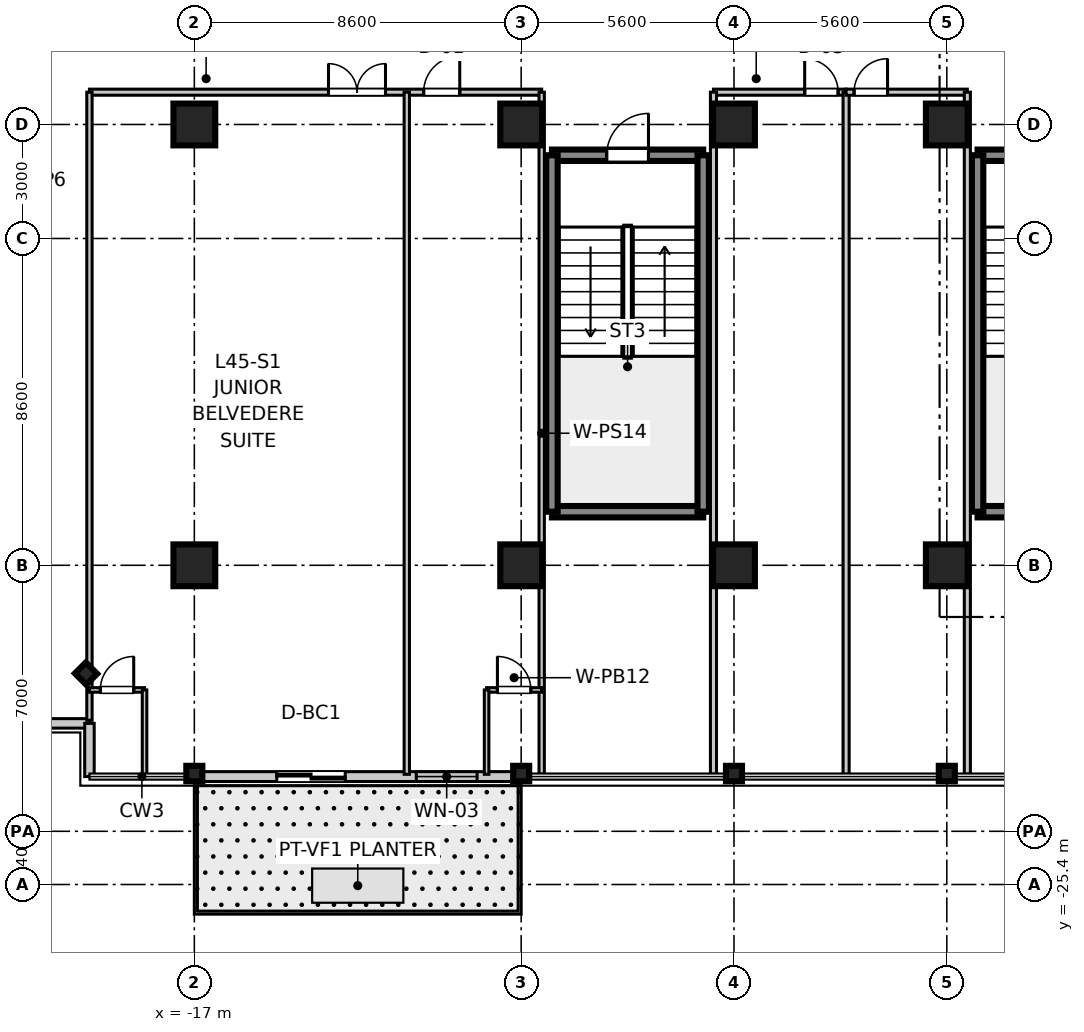
"""IFC4 building model, lengths in metres.
Left out: names, types, materials, properties, quantities, classifications, styles, units other than length and angle.
Written with IfcOpenShell. Run it as: python <this file> out.ifc"""

import sys

from ifc_helpers import new_model, si_unit, direction, frame, frame_2d, origin, origin_2d, place, context, subcontext, project, spatial, rectangle, i_section, extrude, source, transform, mapped, element, fill, save


model = new_model("IFC4")
c1 = context("Model", 3, precision=1e-05, world=origin(), true_north=direction((0.0, 1.0)))
c2 = subcontext(c1, "Body", "Model", "MODEL_VIEW")
j1 = project(units=[si_unit("LENGTHUNIT", "METRE"), si_unit("PLANEANGLEUNIT", "RADIAN")], contexts=[c1])
p1 = place(None, origin())
s1 = spatial("IfcSite", under=j1, at=p1, CompositionType="ELEMENT")
p2 = place(p1, origin())
s2 = spatial("IfcBuilding", under=s1, at=p2, CompositionType="ELEMENT")
p3 = place(p2, frame((0.0, 0.0, 178.2)))
s3 = spatial("IfcBuildingStorey", under=s2, at=p3, CompositionType="ELEMENT", Elevation=178.2)
m1 = source(origin(), c2, "Body", "SweptSolid", [
    extrude(rectangle(XDim=1.1, YDim=1.1, at=origin_2d()), origin(), (0.0, 0.0, 1.0), 3.605),
])
for number, where, z_axis, x_axis in (
    (1, (-17.0, -17.0, 0.0), (0.0, 0.0, 1.0), (1.0, 0.0, 0.0)),
    (2, (-17.0, -5.4, 0.0), (0.0, 0.0, 1.0), (1.0, 0.0, 0.0)),
    (3, (-8.4, -17.0, 0.0), (0.0, 0.0, 1.0), (1.0, 0.0, 0.0)),
    (4, (-8.4, -5.4, 0.0), (0.0, 0.0, 1.0), (1.0, 0.0, 0.0)),
    (5, (-2.8, -17.0, 0.0), (0.0, 0.0, 1.0), (1.0, 0.0, 0.0)),
    (6, (-2.8, -5.4, 0.0), (0.0, 0.0, 1.0), (1.0, 0.0, 0.0)),
    (7, (2.8, -17.0, 0.0), (0.0, 0.0, 1.0), (1.0, 0.0, 0.0)),
    (8, (2.8, -5.4, 0.0), (0.0, 0.0, 1.0), (1.0, 0.0, 0.0)),
):
    element("IfcColumn", number, at=place(p3, frame(where, z_axis=z_axis, x_axis=x_axis)), inside=s3, PredefinedType="COLUMN", context=c2, shape_type="MappedRepresentation", body=[
        mapped(m1, transform((0.0, 0.0, 0.0), scale=1.0)),
    ])
m2 = source(origin(), c2, "Body", "SweptSolid", [
    extrude(i_section(OverallWidth=0.406, OverallDepth=0.422, WebThickness=0.019, FlangeThickness=0.03, at=origin_2d()), origin(), (0.0, 0.0, 1.0), 3.605),
])
for number, where, z_axis, x_axis in (
    (9, (-17.0, -22.48, 0.0), (0.0, 0.0, 1.0), (0.0, 1.0, 0.0)),
    (10, (-8.4, -22.48, 0.0), (0.0, 0.0, 1.0), (0.0, 1.0, 0.0)),
    (11, (-2.8, -22.48, 0.0), (0.0, 0.0, 1.0), (0.0, 1.0, 0.0)),
    (12, (2.8, -22.48, 0.0), (0.0, 0.0, 1.0), (0.0, 1.0, 0.0)),
    (13, (-19.85, -19.85, 0.0), (0.0, 0.0, 1.0), (0.707, 0.707, 0.0)),
):
    element("IfcColumn", number, at=place(p3, frame(where, z_axis=z_axis, x_axis=x_axis)), inside=s3, PredefinedType="COLUMN", context=c2, shape_type="MappedRepresentation", body=[
        mapped(m2, transform((0.0, 0.0, 0.0), scale=1.0)),
    ])
m3 = source(origin(), c2, "Body", "SweptSolid", [
    extrude(rectangle(XDim=3.98, YDim=0.3, at=frame_2d((1.99, 0.0))), origin(), (0.0, 0.0, 1.0), 3.39),
])
for number, where, z_axis, x_axis in (
    (14, (3.61, -15.59, 0.0), (0.0, 0.0, 1.0), (1.0, 0.0, 0.0)),
    (15, (3.61, -6.21, 0.0), (0.0, 0.0, 1.0), (1.0, 0.0, 0.0)),
):
    element("IfcWall", number, at=place(p3, frame(where, z_axis=z_axis, x_axis=x_axis)), inside=s3, PredefinedType="SHEAR", context=c2, shape_type="MappedRepresentation", body=[
        mapped(m3, transform((0.0, 0.0, 0.0), scale=1.0)),
    ])
m4 = source(origin(), c2, "Body", "SweptSolid", [
    extrude(rectangle(XDim=9.38, YDim=0.3, at=frame_2d((4.69, 0.0))), origin(), (0.0, 0.0, 1.0), 3.39),
])
p4 = place(p3, frame((3.61, -15.59, 0.0), z_axis=(0.0, 0.0, 1.0), x_axis=(0.0, 1.0, 0.0)))
e16 = element("IfcWall", 16, at=p4, inside=s3, PredefinedType="SHEAR", context=c2, shape_type="MappedRepresentation", body=[
    mapped(m4, transform((0.0, 0.0, 0.0), scale=1.0)),
])
p5 = place(p3, frame((-7.59, -15.59, 0.0), z_axis=(0.0, 0.0, 1.0), x_axis=(1.0, 0.0, 0.0)))
e17 = element("IfcWall", 17, at=p5, inside=s3, PredefinedType="SHEAR", context=c2, shape_type="MappedRepresentation", body=[
    mapped(m3, transform((0.0, 0.0, 0.0), scale=1.0)),
])
p6 = place(p3, frame((-7.59, -6.21, 0.0), z_axis=(0.0, 0.0, 1.0), x_axis=(1.0, 0.0, 0.0)))
e18 = element("IfcWall", 18, at=p6, inside=s3, PredefinedType="SHEAR", context=c2, shape_type="MappedRepresentation", body=[
    mapped(m3, transform((0.0, 0.0, 0.0), scale=1.0)),
])
p7 = place(p6, frame((1.44, 0.0, 0.0)))
e19 = element("IfcOpeningElement", 19, at=p7, cuts=e18, PredefinedType="OPENING", context=c2, shape_type="SweptSolid", body=[
    extrude(rectangle(XDim=1.1, YDim=2.15, at=frame_2d((0.55, 1.075))), frame((0.0, 0.16, 0.0), z_axis=(0.0, -1.0, 0.0), x_axis=(1.0, 0.0, 0.0)), (0.0, 0.0, 1.0), 0.32),
])
for number, where, z_axis, x_axis in (
    (20, (-7.59, -15.59, 0.0), (0.0, 0.0, 1.0), (0.0, 1.0, 0.0)),
    (21, (-3.61, -15.59, 0.0), (0.0, 0.0, 1.0), (0.0, 1.0, 0.0)),
):
    element("IfcWall", number, at=place(p3, frame(where, z_axis=z_axis, x_axis=x_axis)), inside=s3, PredefinedType="SHEAR", context=c2, shape_type="MappedRepresentation", body=[
        mapped(m4, transform((0.0, 0.0, 0.0), scale=1.0)),
    ])
m5 = source(origin(), c2, "Body", "SweptSolid", [
    extrude(rectangle(XDim=1.4, YDim=0.25, at=frame_2d((0.7, 0.0))), origin(), (0.0, 0.0, 1.0), 3.39),
])
p8 = place(p3, frame((-21.16, -21.16, 0.0), z_axis=(0.0, 0.0, 1.0), x_axis=(1.0, 0.0, 0.0)))
e22 = element("IfcWall", 22, at=p8, inside=s3, PredefinedType="STANDARD", context=c2, shape_type="MappedRepresentation", body=[
    mapped(m5, transform((0.0, 0.0, 0.0), scale=1.0)),
])
m6 = source(origin(), c2, "Body", "SweptSolid", [
    extrude(rectangle(XDim=1.4, YDim=0.25, at=frame_2d((0.7, 0.0))), origin(), (0.0, 0.0, 1.0), 3.39),
])
p9 = place(p3, frame((-19.76, -22.56, 0.0), z_axis=(0.0, 0.0, 1.0), x_axis=(0.0, 1.0, 0.0)))
e23 = element("IfcWall", 23, at=p9, inside=s3, PredefinedType="STANDARD", context=c2, shape_type="MappedRepresentation", body=[
    mapped(m6, transform((0.0, 0.0, 0.0), scale=1.0)),
])
m7 = source(origin(), c2, "Body", "SweptSolid", [
    extrude(rectangle(XDim=8.6, YDim=0.26, at=frame_2d((4.3, 0.0))), origin(), (0.0, 0.0, 1.0), 2.87),
])
p10 = place(p3, frame((-17.0, -22.56, 0.0), z_axis=(0.0, 0.0, 1.0), x_axis=(1.0, 0.0, 0.0)))
e24 = element("IfcWall", 24, at=p10, inside=s3, PredefinedType="STANDARD", context=c2, shape_type="MappedRepresentation", body=[
    mapped(m7, transform((0.0, 0.0, 0.0), scale=1.0)),
])
p11 = place(p10, frame((2.17, 0.0, 0.0)))
e25 = element("IfcOpeningElement", 25, at=p11, cuts=e24, PredefinedType="OPENING", context=c2, shape_type="SweptSolid", body=[
    extrude(rectangle(XDim=1.8, YDim=2.25, at=frame_2d((0.9, 1.125))), frame((0.0, 0.14, 0.0), z_axis=(0.0, -1.0, 0.0), x_axis=(1.0, 0.0, 0.0)), (0.0, 0.0, 1.0), 0.28),
])
p12 = place(p10, frame((5.84, 0.0, 0.85)))
e26 = element("IfcOpeningElement", 26, at=p12, cuts=e24, PredefinedType="OPENING", context=c2, shape_type="SweptSolid", body=[
    extrude(rectangle(XDim=1.6, YDim=1.8, at=frame_2d((0.8, 0.9))), frame((0.0, 0.14, 0.0), z_axis=(0.0, -1.0, 0.0), x_axis=(1.0, 0.0, 0.0)), (0.0, 0.0, 1.0), 0.28),
])
m8 = source(origin(), c2, "Body", "SweptSolid", [
    extrude(rectangle(XDim=11.9, YDim=0.16, at=frame_2d((5.95, 0.0))), origin(), (0.0, 0.0, 1.0), 2.73),
])
p13 = place(p3, frame((-19.76, -4.55, 0.0), z_axis=(0.0, 0.0, 1.0), x_axis=(1.0, 0.0, 0.0)))
e27 = element("IfcWall", 27, at=p13, inside=s3, PredefinedType="PARTITIONING", context=c2, shape_type="MappedRepresentation", body=[
    mapped(m8, transform((0.0, 0.0, 0.0), scale=1.0)),
])
p14 = place(p13, frame((6.29, 0.0, 0.0)))
e28 = element("IfcOpeningElement", 28, at=p14, cuts=e27, PredefinedType="OPENING", context=c2, shape_type="SweptSolid", body=[
    extrude(rectangle(XDim=1.5, YDim=2.15, at=frame_2d((0.75, 1.075))), frame((0.0, 0.09, 0.0), z_axis=(0.0, -1.0, 0.0), x_axis=(1.0, 0.0, 0.0)), (0.0, 0.0, 1.0), 0.18),
])
p15 = place(p13, frame((8.794, 0.0, 0.0)))
e29 = element("IfcOpeningElement", 29, at=p15, cuts=e27, PredefinedType="OPENING", context=c2, shape_type="SweptSolid", body=[
    extrude(rectangle(XDim=0.95, YDim=2.1, at=frame_2d((0.475, 1.05))), frame((0.0, 0.09, 0.0), z_axis=(0.0, -1.0, 0.0), x_axis=(1.0, 0.0, 0.0)), (0.0, 0.0, 1.0), 0.18),
])
m9 = source(origin(), c2, "Body", "SweptSolid", [
    extrude(rectangle(XDim=16.53, YDim=0.14, at=frame_2d((8.265, 0.0))), origin(), (0.0, 0.0, 1.0), 2.73),
])
p16 = place(p3, frame((-19.76, -21.08, 0.0), z_axis=(0.0, 0.0, 1.0), x_axis=(0.0, 1.0, 0.0)))
e30 = element("IfcWall", 30, at=p16, inside=s3, PredefinedType="PARTITIONING", context=c2, shape_type="MappedRepresentation", body=[
    mapped(m9, transform((0.0, 0.0, 0.0), scale=1.0)),
])
m10 = source(origin(), c2, "Body", "SweptSolid", [
    extrude(rectangle(XDim=17.95, YDim=0.14, at=frame_2d((8.975, 0.0))), origin(), (0.0, 0.0, 1.0), 2.73),
])
p17 = place(p3, frame((-7.86, -22.5, 0.0), z_axis=(0.0, 0.0, 1.0), x_axis=(0.0, 1.0, 0.0)))
e31 = element("IfcWall", 31, at=p17, inside=s3, PredefinedType="PARTITIONING", context=c2, shape_type="MappedRepresentation", body=[
    mapped(m10, transform((0.0, 0.0, 0.0), scale=1.0)),
])
m11 = source(origin(), c2, "Body", "SweptSolid", [
    extrude(rectangle(XDim=1.45, YDim=0.12, at=frame_2d((0.725, 0.0))), origin(), (0.0, 0.0, 1.0), 2.73),
])
p18 = place(p3, frame((-19.76, -20.28, 0.0), z_axis=(0.0, 0.0, 1.0), x_axis=(1.0, 0.0, 0.0)))
e32 = element("IfcWall", 32, at=p18, inside=s3, PredefinedType="PARTITIONING", context=c2, shape_type="MappedRepresentation", body=[
    mapped(m11, transform((0.0, 0.0, 0.0), scale=1.0)),
])
p19 = place(p18, frame((0.285, 0.0, 0.0)))
e33 = element("IfcOpeningElement", 33, at=p19, cuts=e32, PredefinedType="OPENING", context=c2, shape_type="SweptSolid", body=[
    extrude(rectangle(XDim=0.88, YDim=2.1, at=frame_2d((0.44, 1.05))), frame((0.0, 0.07, 0.0), z_axis=(0.0, -1.0, 0.0), x_axis=(1.0, 0.0, 0.0)), (0.0, 0.0, 1.0), 0.14),
])
m12 = source(origin(), c2, "Body", "SweptSolid", [
    extrude(rectangle(XDim=2.22, YDim=0.12, at=frame_2d((1.11, 0.0))), origin(), (0.0, 0.0, 1.0), 2.73),
])
p20 = place(p3, frame((-18.31, -22.5, 0.0), z_axis=(0.0, 0.0, 1.0), x_axis=(0.0, 1.0, 0.0)))
e34 = element("IfcWall", 34, at=p20, inside=s3, PredefinedType="PARTITIONING", context=c2, shape_type="MappedRepresentation", body=[
    mapped(m12, transform((0.0, 0.0, 0.0), scale=1.0)),
])
p21 = place(p3, frame((-11.41, -22.5, 0.0), z_axis=(0.0, 0.0, 1.0), x_axis=(0.0, 1.0, 0.0)))
e35 = element("IfcWall", 35, at=p21, inside=s3, PredefinedType="PARTITIONING", context=c2, shape_type="MappedRepresentation", body=[
    mapped(m10, transform((0.0, 0.0, 0.0), scale=1.0)),
])
p22 = place(p3, frame((-9.31, -20.28, 0.0), z_axis=(0.0, 0.0, 1.0), x_axis=(1.0, 0.0, 0.0)))
e36 = element("IfcWall", 36, at=p22, inside=s3, PredefinedType="PARTITIONING", context=c2, shape_type="MappedRepresentation", body=[
    mapped(m11, transform((0.0, 0.0, 0.0), scale=1.0)),
])
p23 = place(p22, frame((0.285, 0.0, 0.0)))
e37 = element("IfcOpeningElement", 37, at=p23, cuts=e36, PredefinedType="OPENING", context=c2, shape_type="SweptSolid", body=[
    extrude(rectangle(XDim=0.88, YDim=2.1, at=frame_2d((0.44, 1.05))), frame((0.0, 0.07, 0.0), z_axis=(0.0, -1.0, 0.0), x_axis=(1.0, 0.0, 0.0)), (0.0, 0.0, 1.0), 0.14),
])
p24 = place(p3, frame((-9.31, -22.5, 0.0), z_axis=(0.0, 0.0, 1.0), x_axis=(0.0, 1.0, 0.0)))
e38 = element("IfcWall", 38, at=p24, inside=s3, PredefinedType="PARTITIONING", context=c2, shape_type="MappedRepresentation", body=[
    mapped(m12, transform((0.0, 0.0, 0.0), scale=1.0)),
])
m13 = source(origin(), c2, "Body", "SweptSolid", [
    extrude(rectangle(XDim=3.49, YDim=0.16, at=frame_2d((1.745, 0.0))), origin(), (0.0, 0.0, 1.0), 2.73),
])
p25 = place(p3, frame((-3.34, -4.55, 0.0), z_axis=(0.0, 0.0, 1.0), x_axis=(1.0, 0.0, 0.0)))
e39 = element("IfcWall", 39, at=p25, inside=s3, PredefinedType="PARTITIONING", context=c2, shape_type="MappedRepresentation", body=[
    mapped(m13, transform((0.0, 0.0, 0.0), scale=1.0)),
])
p26 = place(p25, frame((2.4, 0.0, 0.0)))
e40 = element("IfcOpeningElement", 40, at=p26, cuts=e39, PredefinedType="OPENING", context=c2, shape_type="SweptSolid", body=[
    extrude(rectangle(XDim=0.88, YDim=2.1, at=frame_2d((0.44, 1.05))), frame((0.0, 0.09, 0.0), z_axis=(0.0, -1.0, 0.0), x_axis=(1.0, 0.0, 0.0)), (0.0, 0.0, 1.0), 0.18),
])
m14 = source(origin(), c2, "Body", "SweptSolid", [
    extrude(rectangle(XDim=17.95, YDim=0.16, at=frame_2d((8.975, 0.0))), origin(), (0.0, 0.0, 1.0), 2.73),
])
for number, where, z_axis, x_axis in (
    (41, (-3.34, -22.5, 0.0), (0.0, 0.0, 1.0), (0.0, 1.0, 0.0)),
    (42, (0.15, -22.5, 0.0), (0.0, 0.0, 1.0), (0.0, 1.0, 0.0)),
):
    element("IfcWall", number, at=place(p3, frame(where, z_axis=z_axis, x_axis=x_axis)), inside=s3, PredefinedType="PARTITIONING", context=c2, shape_type="MappedRepresentation", body=[
        mapped(m14, transform((0.0, 0.0, 0.0), scale=1.0)),
    ])
m15 = source(origin(), c2, "Body", "SweptSolid", [
    extrude(rectangle(XDim=3.19, YDim=0.16, at=frame_2d((1.595, 0.0))), origin(), (0.0, 0.0, 1.0), 2.73),
])
p27 = place(p3, frame((0.15, -4.55, 0.0), z_axis=(0.0, 0.0, 1.0), x_axis=(1.0, 0.0, 0.0)))
e43 = element("IfcWall", 43, at=p27, inside=s3, PredefinedType="PARTITIONING", context=c2, shape_type="MappedRepresentation", body=[
    mapped(m15, transform((0.0, 0.0, 0.0), scale=1.0)),
])
p28 = place(p27, frame((0.21, 0.0, 0.0)))
e44 = element("IfcOpeningElement", 44, at=p28, cuts=e43, PredefinedType="OPENING", context=c2, shape_type="SweptSolid", body=[
    extrude(rectangle(XDim=0.88, YDim=2.1, at=frame_2d((0.44, 1.05))), frame((0.0, 0.09, 0.0), z_axis=(0.0, -1.0, 0.0), x_axis=(1.0, 0.0, 0.0)), (0.0, 0.0, 1.0), 0.18),
])
p29 = place(p3, frame((3.34, -22.5, 0.0), z_axis=(0.0, 0.0, 1.0), x_axis=(0.0, 1.0, 0.0)))
e45 = element("IfcWall", 45, at=p29, inside=s3, PredefinedType="PARTITIONING", context=c2, shape_type="MappedRepresentation", body=[
    mapped(m14, transform((0.0, 0.0, 0.0), scale=1.0)),
])
m16 = source(origin(), c2, "Body", "SweptSolid", [
    extrude(rectangle(XDim=1.1, YDim=2.15, at=frame_2d((0.55, 1.075))), frame((0.0, 0.025, 0.0), z_axis=(0.0, -1.0, 0.0), x_axis=(1.0, 0.0, 0.0)), (0.0, 0.0, 1.0), 0.05),
])
p30 = place(p7, frame((1.1, 0.0, 0.0), z_axis=(0.0, 0.0, 1.0), x_axis=(-1.0, 0.0, 0.0)))
e46 = element("IfcDoor", 46, at=p30, inside=s3, OperationType="SINGLE_SWING_RIGHT", PredefinedType="DOOR", context=c2, shape_type="MappedRepresentation", body=[
    mapped(m16, transform((0.0, 0.0, 0.0), scale=1.0)),
])
fill(e19, e46)
m17 = source(origin(), c2, "Body", "SweptSolid", [
    extrude(rectangle(XDim=0.88, YDim=2.1, at=frame_2d((0.44, 1.05))), frame((0.0, 0.025, 0.0), z_axis=(0.0, -1.0, 0.0), x_axis=(1.0, 0.0, 0.0)), (0.0, 0.0, 1.0), 0.05),
])
p31 = place(p19, frame((0.88, 0.0, 0.0), z_axis=(0.0, 0.0, 1.0), x_axis=(-1.0, 0.0, 0.0)))
e47 = element("IfcDoor", 47, at=p31, inside=s3, OperationType="SINGLE_SWING_RIGHT", PredefinedType="DOOR", context=c2, shape_type="MappedRepresentation", body=[
    mapped(m17, transform((0.0, 0.0, 0.0), scale=1.0)),
])
fill(e33, e47)
m18 = source(origin(), c2, "Body", "SweptSolid", [
    extrude(rectangle(XDim=1.5, YDim=2.15, at=frame_2d((0.75, 1.075))), frame((0.0, 0.025, 0.0), z_axis=(0.0, -1.0, 0.0), x_axis=(1.0, 0.0, 0.0)), (0.0, 0.0, 1.0), 0.05),
])
p32 = place(p14, frame((1.5, 0.0, 0.0), z_axis=(0.0, 0.0, 1.0), x_axis=(-1.0, 0.0, 0.0)))
e48 = element("IfcDoor", 48, at=p32, inside=s3, OperationType="DOUBLE_DOOR_SINGLE_SWING", PredefinedType="DOOR", context=c2, shape_type="MappedRepresentation", body=[
    mapped(m18, transform((0.0, 0.0, 0.0), scale=1.0)),
])
fill(e28, e48)
p33 = place(p23, frame((0.88, 0.0, 0.0), z_axis=(0.0, 0.0, 1.0), x_axis=(-1.0, 0.0, 0.0)))
e49 = element("IfcDoor", 49, at=p33, inside=s3, OperationType="SINGLE_SWING_LEFT", PredefinedType="DOOR", context=c2, shape_type="MappedRepresentation", body=[
    mapped(m17, transform((0.0, 0.0, 0.0), scale=1.0)),
])
fill(e37, e49)
m19 = source(origin(), c2, "Body", "SweptSolid", [
    extrude(rectangle(XDim=0.95, YDim=2.1, at=frame_2d((0.475, 1.05))), frame((0.0, 0.025, 0.0), z_axis=(0.0, -1.0, 0.0), x_axis=(1.0, 0.0, 0.0)), (0.0, 0.0, 1.0), 0.05),
])
p34 = place(p15, frame((0.95, 0.0, 0.0), z_axis=(0.0, 0.0, 1.0), x_axis=(-1.0, 0.0, 0.0)))
e50 = element("IfcDoor", 50, at=p34, inside=s3, OperationType="SINGLE_SWING_RIGHT", PredefinedType="DOOR", context=c2, shape_type="MappedRepresentation", body=[
    mapped(m19, transform((0.0, 0.0, 0.0), scale=1.0)),
])
fill(e29, e50)
p35 = place(p26, frame((0.88, 0.0, 0.0), z_axis=(0.0, 0.0, 1.0), x_axis=(-1.0, 0.0, 0.0)))
e51 = element("IfcDoor", 51, at=p35, inside=s3, OperationType="SINGLE_SWING_LEFT", PredefinedType="DOOR", context=c2, shape_type="MappedRepresentation", body=[
    mapped(m17, transform((0.0, 0.0, 0.0), scale=1.0)),
])
fill(e40, e51)
p36 = place(p28, frame((0.88, 0.0, 0.0), z_axis=(0.0, 0.0, 1.0), x_axis=(-1.0, 0.0, 0.0)))
e52 = element("IfcDoor", 52, at=p36, inside=s3, OperationType="SINGLE_SWING_RIGHT", PredefinedType="DOOR", context=c2, shape_type="MappedRepresentation", body=[
    mapped(m17, transform((0.0, 0.0, 0.0), scale=1.0)),
])
fill(e44, e52)
m20 = source(origin(), c2, "Body", "SweptSolid", [
    extrude(rectangle(XDim=1.8, YDim=2.25, at=frame_2d((0.9, 1.125))), frame((0.0, 0.025, 0.0), z_axis=(0.0, -1.0, 0.0), x_axis=(1.0, 0.0, 0.0)), (0.0, 0.0, 1.0), 0.05),
])
p37 = place(p11, frame((1.8, 0.0, 0.0), z_axis=(0.0, 0.0, 1.0), x_axis=(-1.0, 0.0, 0.0)))
e53 = element("IfcDoor", 53, at=p37, inside=s3, OperationType="DOUBLE_DOOR_SLIDING", PredefinedType="DOOR", context=c2, shape_type="MappedRepresentation", body=[
    mapped(m20, transform((0.0, 0.0, 0.0), scale=1.0)),
])
fill(e25, e53)
m21 = source(origin(), c2, "Body", "SweptSolid", [
    extrude(rectangle(XDim=1.6, YDim=1.8, at=frame_2d((0.8, 0.9))), frame((0.0, 0.03, 0.0), z_axis=(0.0, -1.0, 0.0), x_axis=(1.0, 0.0, 0.0)), (0.0, 0.0, 1.0), 0.06),
])
p38 = place(p12, origin())
e54 = element("IfcWindow", 54, at=p38, inside=s3, PartitioningType="SINGLE_PANEL", PredefinedType="WINDOW", context=c2, shape_type="MappedRepresentation", body=[
    mapped(m21, transform((0.0, 0.0, 0.0), scale=1.0)),
])
fill(e26, e54)
save(model, sys.argv[1])
